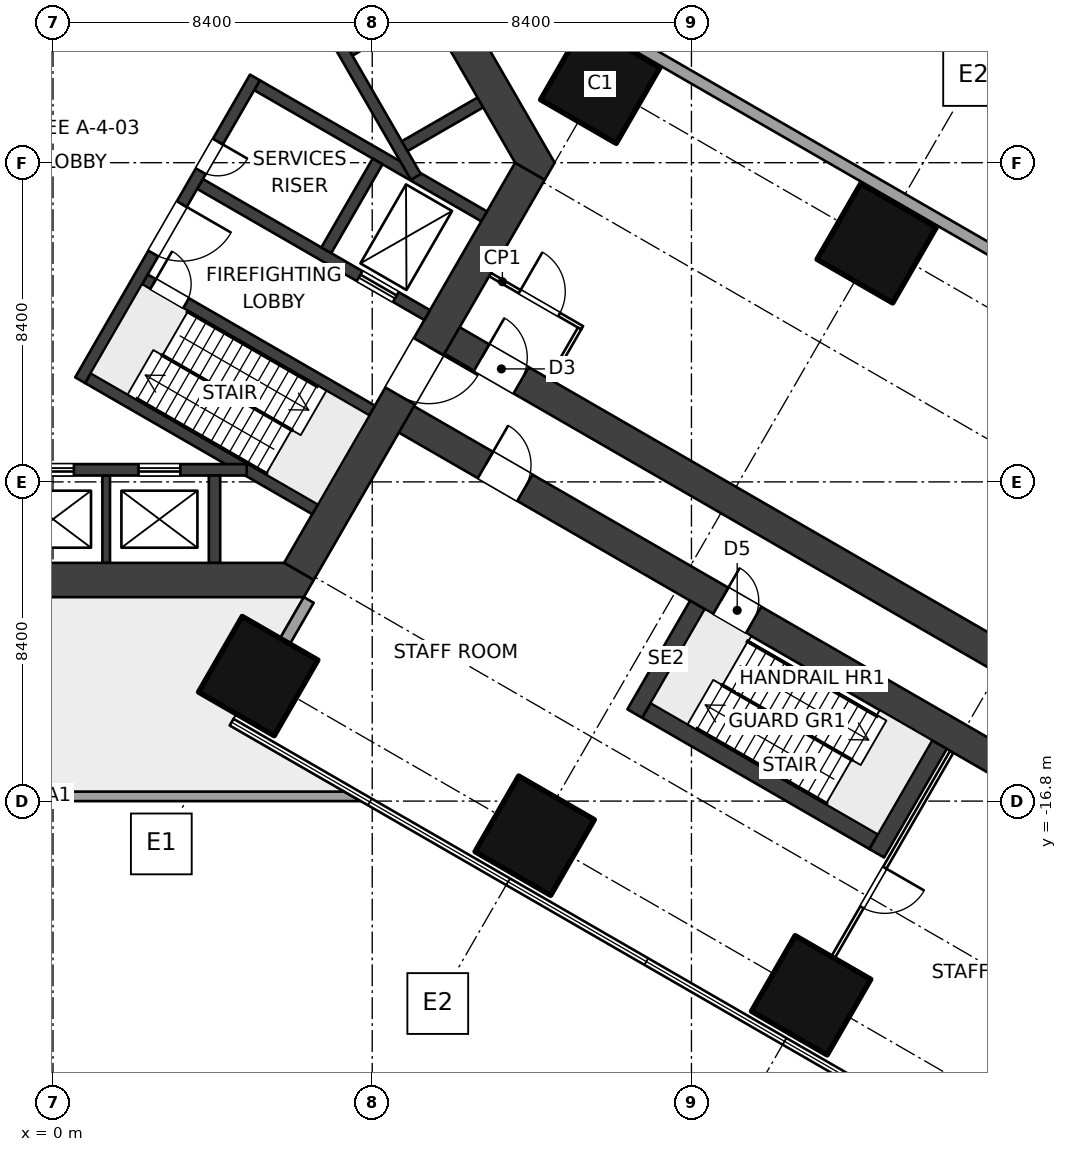
"""IFC4 building model, lengths in metres.
Left out: names, types, materials, properties, quantities, classifications, styles, units other than length and angle.
Written with IfcOpenShell. Run it as: python <this file> out.ifc"""

import sys

from ifc_helpers import new_model, si_unit, direction, frame, frame_2d, origin, origin_2d, place, context, subcontext, project, spatial, polyline, rectangle, outline, extrude, element, fill, save


model = new_model("IFC4")
c1 = context("Model", 3, precision=1e-05, world=origin(), true_north=direction((0.0, 1.0)))
c2 = subcontext(c1, "Body", "Model", "MODEL_VIEW")
j1 = project(units=[si_unit("LENGTHUNIT", "METRE"), si_unit("PLANEANGLEUNIT", "RADIAN")], contexts=[c1])
p1 = place(None, origin())
s1 = spatial("IfcSite", under=j1, at=p1, CompositionType="ELEMENT")
p2 = place(p1, origin())
s2 = spatial("IfcBuilding", under=s1, at=p2, CompositionType="ELEMENT")
p3 = place(p2, frame((0.0, 0.0, 21.0)))
s3 = spatial("IfcBuildingStorey", under=s2, at=p3, CompositionType="ELEMENT", Elevation=21.0)
for number, where, z_axis, x_axis in (
    (1, (14.4, 2.078, 0.0), (0.0, 0.0, 1.0), (-0.5, -0.866, 0.0)),
    (2, (5.4, -13.51, 0.0), (0.0, 0.0, 1.0), (-0.5, -0.866, 0.0)),
    (3, (21.675, -2.122, 0.0), (0.0, 0.0, 1.0), (-0.5, -0.866, 0.0)),
    (4, (12.675, -17.71, 0.0), (0.0, 0.0, 1.0), (-0.5, -0.866, 0.0)),
    (5, (19.949, -21.91, 0.0), (0.0, 0.0, 1.0), (-0.5, -0.866, 0.0)),
):
    element("IfcColumn", number, at=place(p3, frame(where, z_axis=z_axis, x_axis=x_axis)), inside=s3, PredefinedType="COLUMN", context=c2, shape_type="SweptSolid", body=[
        extrude(rectangle(XDim=2.3, YDim=2.3, at=origin_2d()), origin(), (0.0, 0.0, 1.0), 5.0),
    ])
p4 = place(p3, frame((12.551, -0.225, 0.0), z_axis=(0.0, 0.0, 1.0), x_axis=(-0.499997612506, -0.8660267822, 0.0)))
e6 = element("IfcWall", 6, at=p4, inside=s3, PredefinedType="SHEAR", context=c2, shape_type="SweptSolid", body=[
    extrude(rectangle(XDim=12.161, YDim=0.9, at=frame_2d((6.08, 0.0))), origin(), (0.0, 0.0, 1.0), 5.0),
])
p5 = place(p4, frame((5.33, 0.0, 0.0)))
e7 = element("IfcOpeningElement", 7, at=p5, cuts=e6, PredefinedType="OPENING", context=c2, shape_type="SweptSolid", body=[
    extrude(rectangle(XDim=1.5, YDim=2.1, at=frame_2d((0.75, 1.05))), frame((0.0, 0.46, 0.0), z_axis=(0.0, -1.0, 0.0), x_axis=(1.0, 0.0, 0.0)), (0.0, 0.0, 1.0), 0.92),
])
p6 = place(p3, origin())
e8 = element("IfcWall", 8, at=p6, inside=s3, PredefinedType="SHEAR", context=c2, shape_type="SweptSolid", body=[
    extrude(outline(polyline([(-6.6, -11.432), (6.6, -11.432), (6.86, -10.981), (6.08, -10.531), (-6.08, -10.531), (-6.86, -10.981), (-6.6, -11.432)])), origin(), (0.0, 0.0, 1.0), 5.0),
])
p7 = place(p3, origin())
e9 = element("IfcWall", 9, at=p7, inside=s3, PredefinedType="SHEAR", context=c2, shape_type="SweptSolid", body=[
    extrude(outline(polyline([(13.2, 0.0), (6.6, 11.432), (6.08, 11.432), (6.08, 10.531), (12.161, 0.0), (12.94, -0.45), (13.2, 0.0)])), origin(), (0.0, 0.0, 1.0), 5.0),
])
p8 = place(p3, frame((5.314, 2.244, 0.0), z_axis=(0.0, 0.0, 1.0), x_axis=(-0.499995050369, -0.866028261437, 0.0)))
e10 = element("IfcWall", 10, at=p8, inside=s3, PredefinedType="SHEAR", context=c2, shape_type="SweptSolid", body=[
    extrude(rectangle(XDim=9.2, YDim=0.3, at=frame_2d((4.6, 0.0))), origin(), (0.0, 0.0, 1.0), 5.0),
])
p9 = place(p8, frame((3.85, 0.0, 0.0)))
e11 = element("IfcOpeningElement", 11, at=p9, cuts=e10, PredefinedType="OPENING", context=c2, shape_type="SweptSolid", body=[
    extrude(rectangle(XDim=1.5, YDim=2.1, at=frame_2d((0.75, 1.05))), frame((0.0, 0.16, 0.0), z_axis=(0.0, -1.0, 0.0), x_axis=(1.0, 0.0, 0.0)), (0.0, 0.0, 1.0), 0.32),
])
p10 = place(p8, frame((1.95, 0.0, 0.0)))
e12 = element("IfcOpeningElement", 12, at=p10, cuts=e10, PredefinedType="OPENING", context=c2, shape_type="SweptSolid", body=[
    extrude(rectangle(XDim=0.9, YDim=2.1, at=frame_2d((0.45, 1.05))), frame((0.0, 0.16, 0.0), z_axis=(0.0, -1.0, 0.0), x_axis=(1.0, 0.0, 0.0)), (0.0, 0.0, 1.0), 0.32),
])
p11 = place(p3, frame((2.419, -3.071, 0.0), z_axis=(0.0, 0.0, 1.0), x_axis=(0.86602711848, -0.499997030048, 0.0)))
e13 = element("IfcWall", 13, at=p11, inside=s3, PredefinedType="SHEAR", context=c2, shape_type="SweptSolid", body=[
    extrude(rectangle(XDim=6.901, YDim=0.3, at=frame_2d((3.451, 0.0))), origin(), (0.0, 0.0, 1.0), 5.0),
])
p12 = place(p11, frame((0.25, 0.0, 0.0)))
e14 = element("IfcOpeningElement", 14, at=p12, cuts=e13, PredefinedType="OPENING", context=c2, shape_type="SweptSolid", body=[
    extrude(rectangle(XDim=1.0, YDim=2.1, at=frame_2d((0.5, 1.05))), frame((0.0, 0.16, 0.0), z_axis=(0.0, -1.0, 0.0), x_axis=(1.0, 0.0, 0.0)), (0.0, 0.0, 1.0), 0.32),
])
p13 = place(p3, frame((0.919, -5.669, 0.0), z_axis=(0.0, 0.0, 1.0), x_axis=(0.866011800373, -0.500023561059, 0.0)))
e15 = element("IfcWall", 15, at=p13, inside=s3, PredefinedType="SHEAR", context=c2, shape_type="SweptSolid", body=[
    extrude(rectangle(XDim=6.902, YDim=0.3, at=frame_2d((3.451, 0.0))), origin(), (0.0, 0.0, 1.0), 5.0),
])
p14 = place(p3, frame((3.869, -0.559, 0.0), z_axis=(0.0, 0.0, 1.0), x_axis=(0.86602711848, -0.499997030048, 0.0)))
e16 = element("IfcWall", 16, at=p14, inside=s3, PredefinedType="SHEAR", context=c2, shape_type="SweptSolid", body=[
    extrude(rectangle(XDim=6.901, YDim=0.3, at=frame_2d((3.451, 0.0))), origin(), (0.0, 0.0, 1.0), 5.0),
])
p15 = place(p14, frame((4.85, 0.0, 0.0)))
e17 = element("IfcOpeningElement", 17, at=p15, cuts=e16, PredefinedType="OPENING", context=c2, shape_type="SweptSolid", body=[
    extrude(rectangle(XDim=1.1, YDim=2.1, at=frame_2d((0.55, 1.05))), frame((0.0, 0.16, 0.0), z_axis=(0.0, -1.0, 0.0), x_axis=(1.0, 0.0, 0.0)), (0.0, 0.0, 1.0), 0.32),
])
p16 = place(p3, frame((5.369, 2.039, 0.0), z_axis=(0.0, 0.0, 1.0), x_axis=(0.86602711848, -0.499997030048, 0.0)))
e18 = element("IfcWall", 18, at=p16, inside=s3, PredefinedType="SHEAR", context=c2, shape_type="SweptSolid", body=[
    extrude(rectangle(XDim=6.901, YDim=0.3, at=frame_2d((3.451, 0.0))), origin(), (0.0, 0.0, 1.0), 5.0),
])
p17 = place(p3, frame((8.541, 0.034, 0.0), z_axis=(0.0, 0.0, 1.0), x_axis=(-0.50000943426, -0.866019956843, 0.0)))
e19 = element("IfcWall", 19, at=p17, inside=s3, PredefinedType="SHEAR", context=c2, shape_type="SweptSolid", body=[
    extrude(rectangle(XDim=2.7, YDim=0.3, at=frame_2d((1.35, 0.0))), origin(), (0.0, 0.0, 1.0), 5.0),
])
p18 = place(p3, frame((5.098, -8.082, 0.0), z_axis=(0.0, 0.0, 1.0), x_axis=(-1.0, 0.0, 0.0)))
e20 = element("IfcWall", 20, at=p18, inside=s3, PredefinedType="SHEAR", context=c2, shape_type="SweptSolid", body=[
    extrude(rectangle(XDim=10.195, YDim=0.3, at=frame_2d((5.098, 0.0))), origin(), (0.0, 0.0, 1.0), 5.0),
])
p19 = place(p18, frame((1.748, 0.0, 0.0)))
e21 = element("IfcOpeningElement", 21, at=p19, cuts=e20, PredefinedType="OPENING", context=c2, shape_type="SweptSolid", body=[
    extrude(rectangle(XDim=1.1, YDim=2.1, at=frame_2d((0.55, 1.05))), frame((0.0, 0.16, 0.0), z_axis=(0.0, -1.0, 0.0), x_axis=(1.0, 0.0, 0.0)), (0.0, 0.0, 1.0), 0.32),
])
p20 = place(p18, frame((4.548, 0.0, 0.0)))
e22 = element("IfcOpeningElement", 22, at=p20, cuts=e20, PredefinedType="OPENING", context=c2, shape_type="SweptSolid", body=[
    extrude(rectangle(XDim=1.1, YDim=2.1, at=frame_2d((0.55, 1.05))), frame((0.0, 0.16, 0.0), z_axis=(0.0, -1.0, 0.0), x_axis=(1.0, 0.0, 0.0)), (0.0, 0.0, 1.0), 0.32),
])
p21 = place(p18, frame((7.348, 0.0, 0.0)))
e23 = element("IfcOpeningElement", 23, at=p21, cuts=e20, PredefinedType="OPENING", context=c2, shape_type="SweptSolid", body=[
    extrude(rectangle(XDim=1.1, YDim=2.1, at=frame_2d((0.55, 1.05))), frame((0.0, 0.16, 0.0), z_axis=(0.0, -1.0, 0.0), x_axis=(1.0, 0.0, 0.0)), (0.0, 0.0, 1.0), 0.32),
])
p22 = place(p3, frame((4.25, -8.231, 0.0), z_axis=(0.0, 0.0, 1.0), x_axis=(0.0, -1.0, 0.0)))
e24 = element("IfcWall", 24, at=p22, inside=s3, PredefinedType="SHEAR", context=c2, shape_type="SweptSolid", body=[
    extrude(rectangle(XDim=2.3, YDim=0.3, at=frame_2d((1.15, 0.0))), origin(), (0.0, 0.0, 1.0), 5.0),
])
p23 = place(p3, frame((1.4, -8.231, 0.0), z_axis=(0.0, 0.0, 1.0), x_axis=(0.0, -1.0, 0.0)))
e25 = element("IfcWall", 25, at=p23, inside=s3, PredefinedType="SHEAR", context=c2, shape_type="SweptSolid", body=[
    extrude(rectangle(XDim=2.3, YDim=0.2, at=frame_2d((1.15, 0.0))), origin(), (0.0, 0.0, 1.0), 5.0),
])
p24 = place(p3, frame((4.45, 8.455, 0.0), z_axis=(0.0, 0.0, 1.0), x_axis=(0.500002290144, -0.866024081565, 0.0)))
e26 = element("IfcWall", 26, at=p24, inside=s3, PredefinedType="SHEAR", context=c2, shape_type="SweptSolid", body=[
    extrude(rectangle(XDim=10.195, YDim=0.3, at=frame_2d((5.098, 0.0))), origin(), (0.0, 0.0, 1.0), 5.0),
])
p25 = place(p3, frame((9.254, 0.435, 0.0), z_axis=(0.0, 0.0, 1.0), x_axis=(0.866007057882, 0.500031774688, 0.0)))
e27 = element("IfcWall", 27, at=p25, inside=s3, PredefinedType="SHEAR", context=c2, shape_type="SweptSolid", body=[
    extrude(rectangle(XDim=2.3, YDim=0.3, at=frame_2d((1.15, 0.0))), origin(), (0.0, 0.0, 1.0), 5.0),
])
p26 = place(p3, frame((7.829, 2.903, 0.0), z_axis=(0.0, 0.0, 1.0), x_axis=(0.866053019151, 0.499952165731, 0.0)))
e28 = element("IfcWall", 28, at=p26, inside=s3, PredefinedType="SHEAR", context=c2, shape_type="SweptSolid", body=[
    extrude(rectangle(XDim=2.3, YDim=0.2, at=frame_2d((1.15, 0.0))), origin(), (0.0, 0.0, 1.0), 5.0),
])
p27 = place(p3, frame((10.11, -4.451, 0.0), z_axis=(0.0, 0.0, 1.0), x_axis=(0.866023348156, -0.500003560437, 0.0)))
e29 = element("IfcWall", 29, at=p27, inside=s3, PredefinedType="SHEAR", context=c2, shape_type="SweptSolid", body=[
    extrude(rectangle(XDim=36.888, YDim=0.8, at=frame_2d((18.444, 0.0))), origin(), (0.0, 0.0, 1.0), 5.0),
])
p28 = place(p27, frame((1.35, 0.0, 0.0)))
e30 = element("IfcOpeningElement", 30, at=p28, cuts=e29, PredefinedType="OPENING", context=c2, shape_type="SweptSolid", body=[
    extrude(rectangle(XDim=1.2, YDim=2.1, at=frame_2d((0.6, 1.05))), frame((0.0, 0.41, 0.0), z_axis=(0.0, -1.0, 0.0), x_axis=(1.0, 0.0, 0.0)), (0.0, 0.0, 1.0), 0.82),
])
p29 = place(p3, frame((8.91, -6.53, 0.0), z_axis=(0.0, 0.0, 1.0), x_axis=(0.866026214035, -0.499998596603, 0.0)))
e31 = element("IfcWall", 31, at=p29, inside=s3, PredefinedType="SHEAR", context=c2, shape_type="SweptSolid", body=[
    extrude(rectangle(XDim=36.888, YDim=0.8, at=frame_2d((18.444, 0.0))), origin(), (0.0, 0.0, 1.0), 5.0),
])
p30 = place(p29, frame((10.0, 0.0, 0.0)))
e32 = element("IfcOpeningElement", 32, at=p30, cuts=e31, PredefinedType="OPENING", context=c2, shape_type="SweptSolid", body=[
    extrude(rectangle(XDim=1.0, YDim=2.1, at=frame_2d((0.5, 1.05))), frame((0.0, 0.41, 0.0), z_axis=(0.0, -1.0, 0.0), x_axis=(1.0, 0.0, 0.0)), (0.0, 0.0, 1.0), 0.82),
])
p31 = place(p29, frame((2.85, 0.0, 0.0)))
e33 = element("IfcOpeningElement", 33, at=p31, cuts=e31, PredefinedType="OPENING", context=c2, shape_type="SweptSolid", body=[
    extrude(rectangle(XDim=1.2, YDim=2.1, at=frame_2d((0.6, 1.05))), frame((0.0, 0.41, 0.0), z_axis=(0.0, -1.0, 0.0), x_axis=(1.0, 0.0, 0.0)), (0.0, 0.0, 1.0), 0.82),
])
p32 = place(p3, frame((6.105, -12.589, 0.0), z_axis=(0.0, 0.0, 1.0), x_axis=(0.500004234368, 0.866022959057, 0.0)))
e34 = element("IfcWall", 34, at=p32, inside=s3, PredefinedType="SOLIDWALL", context=c2, shape_type="SweptSolid", body=[
    extrude(rectangle(XDim=1.25, YDim=0.3, at=frame_2d((0.625, 0.0))), origin(), (0.0, 0.0, 1.0), 4.6),
])
p33 = place(p3, origin())
e35 = element("IfcWall", 35, at=p33, inside=s3, PredefinedType="PARAPET", context=c2, shape_type="SweptSolid", body=[
    extrude(outline(polyline([(8.096, -16.8), (-8.096, -16.8), (-7.663, -16.55), (7.663, -16.55), (8.096, -16.8)])), origin(), (0.0, 0.0, 1.0), 1.1),
])
p34 = place(p3, frame((11.5, -2.945, 0.0), z_axis=(0.0, 0.0, 1.0), x_axis=(0.866034573852, -0.49998411664, 0.0)))
e36 = element("IfcWall", 36, at=p34, inside=s3, PredefinedType="PARTITIONING", context=c2, shape_type="SweptSolid", body=[
    extrude(rectangle(XDim=2.8, YDim=0.1, at=frame_2d((1.4, 0.0))), origin(), (0.0, 0.0, 1.0), 4.6),
])
p35 = place(p34, frame((0.9, 0.0, 0.0)))
e37 = element("IfcOpeningElement", 37, at=p35, cuts=e36, PredefinedType="OPENING", context=c2, shape_type="SweptSolid", body=[
    extrude(rectangle(XDim=1.2, YDim=2.1, at=frame_2d((0.6, 1.05))), frame((0.0, 0.06, 0.0), z_axis=(0.0, -1.0, 0.0), x_axis=(1.0, 0.0, 0.0)), (0.0, 0.0, 1.0), 0.12),
])
p36 = place(p3, frame((13.082, -5.705, 0.0), z_axis=(0.0, 0.0, 1.0), x_axis=(0.500086022567, 0.865975732936, 0.0)))
e38 = element("IfcWall", 38, at=p36, inside=s3, PredefinedType="PARTITIONING", context=c2, shape_type="SweptSolid", body=[
    extrude(rectangle(XDim=1.55, YDim=0.1, at=frame_2d((0.775, 0.0))), origin(), (0.0, 0.0, 1.0), 4.6),
])
p37 = place(p3, frame((23.649, -15.501, 0.0), z_axis=(0.0, 0.0, 1.0), x_axis=(-0.500004234368, -0.866022959057, 0.0)))
e39 = element("IfcWall", 39, at=p37, inside=s3, PredefinedType="PARTITIONING", context=c2, shape_type="SweptSolid", body=[
    extrude(rectangle(XDim=6.25, YDim=0.1, at=frame_2d((3.125, 0.0))), origin(), (0.0, 0.0, 1.0), 2.8),
])
p38 = place(p37, frame((3.525, 0.0, 0.0)))
e40 = element("IfcOpeningElement", 40, at=p38, cuts=e39, PredefinedType="OPENING", context=c2, shape_type="SweptSolid", body=[
    extrude(rectangle(XDim=1.2, YDim=2.1, at=frame_2d((0.6, 1.05))), frame((0.0, 0.06, 0.0), z_axis=(0.0, -1.0, 0.0), x_axis=(1.0, 0.0, 0.0)), (0.0, 0.0, 1.0), 0.12),
])
p39 = place(p3, frame((9.45, 6.495, 0.0), z_axis=(0.0, 0.0, 1.0), x_axis=(0.866027750123, -0.499995936, 0.0)))
e41 = element("IfcWall", 41, at=p39, inside=s3, PredefinedType="SOLIDWALL", context=c2, shape_type="SweptSolid", body=[
    extrude(rectangle(XDim=29.39, YDim=0.3, at=frame_2d((14.695, 0.0))), origin(), (0.0, 0.0, 1.0), 4.6),
])
p40 = place(p39, frame((18.195, 0.0, 0.0)))
e42 = element("IfcOpeningElement", 42, at=p40, cuts=e41, PredefinedType="OPENING", context=c2, shape_type="SweptSolid", body=[
    extrude(rectangle(XDim=1.8, YDim=2.4, at=frame_2d((0.9, 1.2))), frame((0.0, 0.16, 0.0), z_axis=(0.0, -1.0, 0.0), x_axis=(1.0, 0.0, 0.0)), (0.0, 0.0, 1.0), 0.32),
])
for number, where, z_axis, x_axis in (
    (43, (16.959, -11.639, 0.0), (0.0, 0.0, 1.0), (-0.5, -0.866, 0.0)),
    (44, (23.324, -15.314, 0.0), (0.0, 0.0, 1.0), (-0.5, -0.866, 0.0)),
):
    element("IfcWall", number, at=place(p3, frame(where, z_axis=z_axis, x_axis=x_axis)), inside=s3, PredefinedType="SOLIDWALL", context=c2, shape_type="SweptSolid", body=[
        extrude(rectangle(XDim=3.3, YDim=0.45, at=frame_2d((1.65, 0.0))), origin(), (0.0, 0.0, 1.0), 5.0),
    ])
p41 = place(p3, frame((15.616, -14.415, 0.0), z_axis=(0.0, 0.0, 1.0), x_axis=(0.866028853923, -0.499994024137, 0.0)))
e45 = element("IfcWall", 45, at=p41, inside=s3, PredefinedType="SOLIDWALL", context=c2, shape_type="SweptSolid", body=[
    extrude(rectangle(XDim=6.9, YDim=0.45, at=frame_2d((3.45, 0.0))), origin(), (0.0, 0.0, 1.0), 5.0),
])
p42 = place(p19, origin())
e46 = element("IfcDoor", 46, at=p42, inside=s3, OperationType="DOUBLE_DOOR_SLIDING", PredefinedType="DOOR", context=c2, shape_type="SweptSolid", body=[
    extrude(rectangle(XDim=1.1, YDim=2.1, at=frame_2d((0.55, 1.05))), frame((0.0, 0.025, 0.0), z_axis=(0.0, -1.0, 0.0), x_axis=(1.0, 0.0, 0.0)), (0.0, 0.0, 1.0), 0.05),
])
fill(e21, e46)
p43 = place(p20, origin())
e47 = element("IfcDoor", 47, at=p43, inside=s3, OperationType="DOUBLE_DOOR_SLIDING", PredefinedType="DOOR", context=c2, shape_type="SweptSolid", body=[
    extrude(rectangle(XDim=1.1, YDim=2.1, at=frame_2d((0.55, 1.05))), frame((0.0, 0.025, 0.0), z_axis=(0.0, -1.0, 0.0), x_axis=(1.0, 0.0, 0.0)), (0.0, 0.0, 1.0), 0.05),
])
fill(e22, e47)
p44 = place(p15, origin())
e48 = element("IfcDoor", 48, at=p44, inside=s3, OperationType="DOUBLE_DOOR_SLIDING", PredefinedType="DOOR", context=c2, shape_type="SweptSolid", body=[
    extrude(rectangle(XDim=1.1, YDim=2.1, at=frame_2d((0.55, 1.05))), frame((0.0, 0.025, 0.0), z_axis=(0.0, -1.0, 0.0), x_axis=(1.0, 0.0, 0.0)), (0.0, 0.0, 1.0), 0.05),
])
fill(e17, e48)
p45 = place(p9, origin())
e49 = element("IfcDoor", 49, at=p45, inside=s3, OperationType="DOUBLE_DOOR_DOUBLE_SWING", PredefinedType="DOOR", context=c2, shape_type="SweptSolid", body=[
    extrude(rectangle(XDim=1.5, YDim=2.1, at=frame_2d((0.75, 1.05))), frame((0.0, 0.025, 0.0), z_axis=(0.0, -1.0, 0.0), x_axis=(1.0, 0.0, 0.0)), (0.0, 0.0, 1.0), 0.05),
])
fill(e11, e49)
p46 = place(p10, origin())
e50 = element("IfcDoor", 50, at=p46, inside=s3, OperationType="SINGLE_SWING_LEFT", PredefinedType="DOOR", context=c2, shape_type="SweptSolid", body=[
    extrude(rectangle(XDim=0.9, YDim=2.1, at=frame_2d((0.45, 1.05))), frame((0.0, 0.025, 0.0), z_axis=(0.0, -1.0, 0.0), x_axis=(1.0, 0.0, 0.0)), (0.0, 0.0, 1.0), 0.05),
])
fill(e12, e50)
p47 = place(p12, origin())
e51 = element("IfcDoor", 51, at=p47, inside=s3, OperationType="SINGLE_SWING_LEFT", PredefinedType="DOOR", context=c2, shape_type="SweptSolid", body=[
    extrude(rectangle(XDim=1.0, YDim=2.1, at=frame_2d((0.5, 1.05))), frame((0.0, 0.025, 0.0), z_axis=(0.0, -1.0, 0.0), x_axis=(1.0, 0.0, 0.0)), (0.0, 0.0, 1.0), 0.05),
])
fill(e14, e51)
p48 = place(p5, origin())
e52 = element("IfcDoor", 52, at=p48, inside=s3, OperationType="DOUBLE_DOOR_DOUBLE_SWING", PredefinedType="DOOR", context=c2, shape_type="SweptSolid", body=[
    extrude(rectangle(XDim=1.5, YDim=2.1, at=frame_2d((0.75, 1.05))), frame((0.0, 0.025, 0.0), z_axis=(0.0, -1.0, 0.0), x_axis=(1.0, 0.0, 0.0)), (0.0, 0.0, 1.0), 0.05),
])
fill(e7, e52)
p49 = place(p30, origin())
e53 = element("IfcDoor", 53, at=p49, inside=s3, OperationType="SINGLE_SWING_LEFT", PredefinedType="DOOR", context=c2, shape_type="SweptSolid", body=[
    extrude(rectangle(XDim=1.0, YDim=2.1, at=frame_2d((0.5, 1.05))), frame((0.0, 0.025, 0.0), z_axis=(0.0, -1.0, 0.0), x_axis=(1.0, 0.0, 0.0)), (0.0, 0.0, 1.0), 0.05),
])
fill(e32, e53)
p50 = place(p28, origin())
e54 = element("IfcDoor", 54, at=p50, inside=s3, OperationType="DOUBLE_SWING_LEFT", PredefinedType="DOOR", context=c2, shape_type="SweptSolid", body=[
    extrude(rectangle(XDim=1.2, YDim=2.1, at=frame_2d((0.6, 1.05))), frame((0.0, 0.025, 0.0), z_axis=(0.0, -1.0, 0.0), x_axis=(1.0, 0.0, 0.0)), (0.0, 0.0, 1.0), 0.05),
])
fill(e30, e54)
p51 = place(p35, origin())
e55 = element("IfcDoor", 55, at=p51, inside=s3, OperationType="DOUBLE_SWING_LEFT", PredefinedType="DOOR", context=c2, shape_type="SweptSolid", body=[
    extrude(rectangle(XDim=1.2, YDim=2.1, at=frame_2d((0.6, 1.05))), frame((0.0, 0.025, 0.0), z_axis=(0.0, -1.0, 0.0), x_axis=(1.0, 0.0, 0.0)), (0.0, 0.0, 1.0), 0.05),
])
fill(e37, e55)
p52 = place(p38, origin())
e56 = element("IfcDoor", 56, at=p52, inside=s3, OperationType="DOUBLE_SWING_LEFT", PredefinedType="DOOR", context=c2, shape_type="SweptSolid", body=[
    extrude(rectangle(XDim=1.2, YDim=2.1, at=frame_2d((0.6, 1.05))), frame((0.0, 0.025, 0.0), z_axis=(0.0, -1.0, 0.0), x_axis=(1.0, 0.0, 0.0)), (0.0, 0.0, 1.0), 0.05),
])
fill(e40, e56)
p53 = place(p31, origin())
e57 = element("IfcDoor", 57, at=p53, inside=s3, OperationType="DOUBLE_SWING_LEFT", PredefinedType="DOOR", context=c2, shape_type="SweptSolid", body=[
    extrude(rectangle(XDim=1.2, YDim=2.1, at=frame_2d((0.6, 1.05))), frame((0.0, 0.025, 0.0), z_axis=(0.0, -1.0, 0.0), x_axis=(1.0, 0.0, 0.0)), (0.0, 0.0, 1.0), 0.05),
])
fill(e33, e57)
save(model, sys.argv[1])
